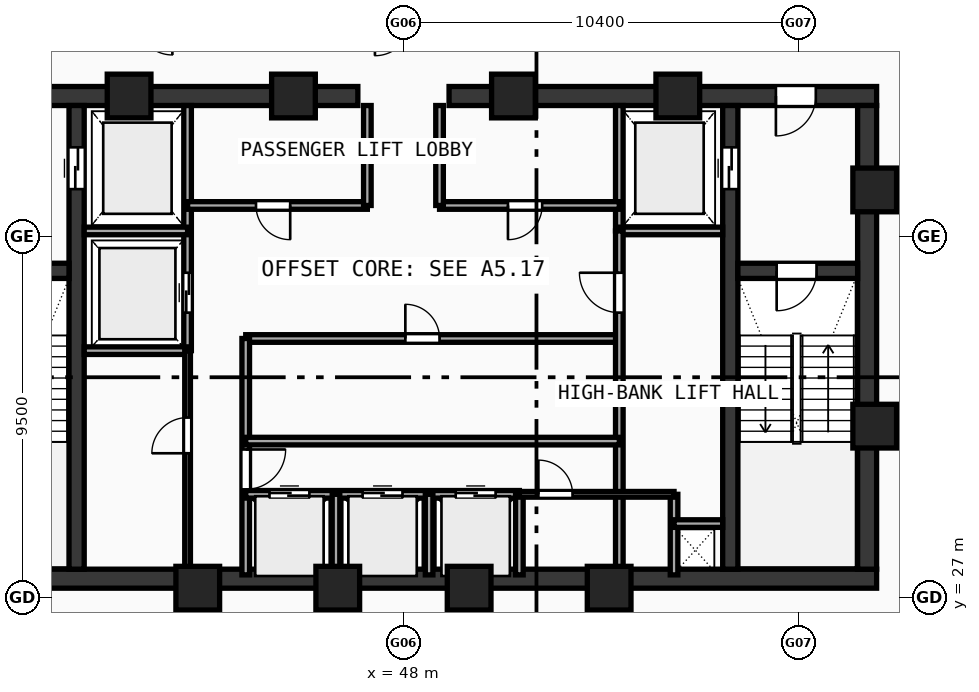
"""IFC4 building model, lengths in metres.
Left out: names, types, materials, properties, quantities, classifications, styles, units other than length and angle.
Written with IfcOpenShell. Run it as: python <this file> out.ifc"""

import sys

from ifc_helpers import new_model, si_unit, direction, frame, frame_2d, origin, origin_with_axes, origin_2d, place, context, subcontext, project, spatial, rectangle, hollow_rectangle, extrude, source, transform, mapped, element, fill, save


model = new_model("IFC4")
c1 = context("Model", 3, precision=1e-05, world=origin(), true_north=direction((0.0, 1.0)))
c2 = subcontext(c1, "Body", "Model", "MODEL_VIEW")
j1 = project(units=[si_unit("LENGTHUNIT", "METRE"), si_unit("PLANEANGLEUNIT", "RADIAN")], contexts=[c1])
p1 = place(None, origin())
s1 = spatial("IfcSite", under=j1, at=p1, CompositionType="ELEMENT")
p2 = place(p1, origin())
s2 = spatial("IfcBuilding", under=s1, at=p2, CompositionType="ELEMENT")
p3 = place(p2, frame((0.0, 0.0, 255.72)))
s3 = spatial("IfcBuildingStorey", under=s2, at=p3, CompositionType="ELEMENT", Elevation=255.72)
p4 = place(p3, frame((35.55, 27.5, 0.0), z_axis=(0.0, 0.0, 1.0), x_axis=(1.0, 0.0, 0.0)))
e1 = element("IfcWall", 1, at=p4, inside=s3, PredefinedType="SHEAR", context=c2, shape_type="SweptSolid", body=[
    extrude(rectangle(XDim=24.9, YDim=0.5, at=frame_2d((12.45, 0.0))), origin(), (0.0, 0.0, 1.0), 3.47),
])
p5 = place(p3, frame((35.55, 40.2, 0.0), z_axis=(0.0, 0.0, 1.0), x_axis=(1.0, 0.0, 0.0)))
e2 = element("IfcWall", 2, at=p5, inside=s3, PredefinedType="SHEAR", context=c2, shape_type="SweptSolid", body=[
    extrude(rectangle(XDim=11.25, YDim=0.5, at=frame_2d((5.625, 0.0))), origin(), (0.0, 0.0, 1.0), 3.47),
])
p6 = place(p5, frame((1.6, 0.0, 0.0)))
e3 = element("IfcOpeningElement", 3, at=p6, cuts=e2, PredefinedType="OPENING", context=c2, shape_type="SweptSolid", body=[
    extrude(rectangle(XDim=1.05, YDim=2.1, at=frame_2d((0.525, 1.05))), frame((0.0, 0.26, 0.0), z_axis=(0.0, -1.0, 0.0), x_axis=(1.0, 0.0, 0.0)), (0.0, 0.0, 1.0), 0.52),
])
p7 = place(p3, frame((49.2, 40.2, 0.0), z_axis=(0.0, 0.0, 1.0), x_axis=(1.0, 0.0, 0.0)))
e4 = element("IfcWall", 4, at=p7, inside=s3, PredefinedType="SHEAR", context=c2, shape_type="SweptSolid", body=[
    extrude(rectangle(XDim=11.25, YDim=0.5, at=frame_2d((5.625, 0.0))), origin(), (0.0, 0.0, 1.0), 3.47),
])
p8 = place(p7, frame((8.6, 0.0, 0.0)))
e5 = element("IfcOpeningElement", 5, at=p8, cuts=e4, PredefinedType="OPENING", context=c2, shape_type="SweptSolid", body=[
    extrude(rectangle(XDim=1.05, YDim=2.1, at=frame_2d((0.525, 1.05))), frame((0.0, 0.26, 0.0), z_axis=(0.0, -1.0, 0.0), x_axis=(1.0, 0.0, 0.0)), (0.0, 0.0, 1.0), 0.52),
])
p9 = place(p3, frame((60.2, 27.75, 0.0), z_axis=(0.0, 0.0, 1.0), x_axis=(0.0, 1.0, 0.0)))
e6 = element("IfcWall", 6, at=p9, inside=s3, PredefinedType="SHEAR", context=c2, shape_type="SweptSolid", body=[
    extrude(rectangle(XDim=12.2, YDim=0.5, at=frame_2d((6.1, 0.0))), origin(), (0.0, 0.0, 1.0), 3.47),
])
p10 = place(p3, frame((39.4, 27.75, 0.0), z_axis=(0.0, 0.0, 1.0), x_axis=(0.0, 1.0, 0.0)))
e7 = element("IfcWall", 7, at=p10, inside=s3, PredefinedType="SHEAR", context=c2, shape_type="SweptSolid", body=[
    extrude(rectangle(XDim=12.2, YDim=0.4, at=frame_2d((6.1, 0.0))), origin(), (0.0, 0.0, 1.0), 3.47),
])
p11 = place(p10, frame((10.0, 0.0, 0.0)))
e8 = element("IfcOpeningElement", 8, at=p11, cuts=e7, PredefinedType="OPENING", context=c2, shape_type="SweptSolid", body=[
    extrude(rectangle(XDim=1.1, YDim=2.1, at=frame_2d((0.55, 1.05))), frame((0.0, 0.21, 0.0), z_axis=(0.0, -1.0, 0.0), x_axis=(1.0, 0.0, 0.0)), (0.0, 0.0, 1.0), 0.42),
])
p12 = place(p3, frame((56.6, 27.75, 0.0), z_axis=(0.0, 0.0, 1.0), x_axis=(0.0, 1.0, 0.0)))
e9 = element("IfcWall", 9, at=p12, inside=s3, PredefinedType="SHEAR", context=c2, shape_type="SweptSolid", body=[
    extrude(rectangle(XDim=12.2, YDim=0.4, at=frame_2d((6.1, 0.0))), origin(), (0.0, 0.0, 1.0), 3.47),
])
p13 = place(p12, frame((10.0, 0.0, 0.0)))
e10 = element("IfcOpeningElement", 10, at=p13, cuts=e9, PredefinedType="OPENING", context=c2, shape_type="SweptSolid", body=[
    extrude(rectangle(XDim=1.1, YDim=2.1, at=frame_2d((0.55, 1.05))), frame((0.0, 0.21, 0.0), z_axis=(0.0, -1.0, 0.0), x_axis=(1.0, 0.0, 0.0)), (0.0, 0.0, 1.0), 0.42),
])
p14 = place(p3, frame((36.05, 35.6, 0.0), z_axis=(0.0, 0.0, 1.0), x_axis=(1.0, 0.0, 0.0)))
e11 = element("IfcWall", 11, at=p14, inside=s3, PredefinedType="SHEAR", context=c2, shape_type="SweptSolid", body=[
    extrude(rectangle(XDim=3.15, YDim=0.4, at=frame_2d((1.575, 0.0))), origin(), (0.0, 0.0, 1.0), 3.47),
])
p15 = place(p14, frame((1.07, 0.0, 0.0)))
e12 = element("IfcOpeningElement", 12, at=p15, cuts=e11, PredefinedType="OPENING", context=c2, shape_type="SweptSolid", body=[
    extrude(rectangle(XDim=1.05, YDim=2.1, at=frame_2d((0.525, 1.05))), frame((0.0, 0.21, 0.0), z_axis=(0.0, -1.0, 0.0), x_axis=(1.0, 0.0, 0.0)), (0.0, 0.0, 1.0), 0.42),
])
p16 = place(p3, frame((56.8, 35.6, 0.0), z_axis=(0.0, 0.0, 1.0), x_axis=(1.0, 0.0, 0.0)))
e13 = element("IfcWall", 13, at=p16, inside=s3, PredefinedType="SHEAR", context=c2, shape_type="SweptSolid", body=[
    extrude(rectangle(XDim=3.15, YDim=0.4, at=frame_2d((1.575, 0.0))), origin(), (0.0, 0.0, 1.0), 3.47),
])
p17 = place(p16, frame((1.02, 0.0, 0.0)))
e14 = element("IfcOpeningElement", 14, at=p17, cuts=e13, PredefinedType="OPENING", context=c2, shape_type="SweptSolid", body=[
    extrude(rectangle(XDim=1.05, YDim=2.1, at=frame_2d((0.525, 1.05))), frame((0.0, 0.21, 0.0), z_axis=(0.0, -1.0, 0.0), x_axis=(1.0, 0.0, 0.0)), (0.0, 0.0, 1.0), 0.42),
])
m1 = source(origin(), c2, "Body", "SweptSolid", [
    extrude(hollow_rectangle(XDim=1.15, YDim=1.15, WallThickness=0.048, at=origin_2d()), origin(), (0.0, 0.0, 1.0), 3.73),
])
for number, where, z_axis, x_axis in (
    (15, (42.588, 27.25, -0.26), (0.0, 0.0, 1.0), (1.0, 0.0, 0.0)),
    (16, (46.272, 27.25, -0.26), (0.0, 0.0, 1.0), (1.0, 0.0, 0.0)),
    (17, (49.729, 27.25, -0.26), (0.0, 0.0, 1.0), (1.0, 0.0, 0.0)),
    (18, (53.412, 27.25, -0.26), (0.0, 0.0, 1.0), (1.0, 0.0, 0.0)),
    (19, (60.4, 31.513, -0.26), (0.0, 0.0, 1.0), (1.0, 0.0, 0.0)),
    (20, (60.4, 37.729, -0.26), (0.0, 0.0, 1.0), (1.0, 0.0, 0.0)),
    (21, (55.219, 40.2, -0.26), (0.0, 0.0, 1.0), (1.0, 0.0, 0.0)),
    (22, (50.894, 40.2, -0.26), (0.0, 0.0, 1.0), (1.0, 0.0, 0.0)),
    (23, (45.106, 40.2, -0.26), (0.0, 0.0, 1.0), (1.0, 0.0, 0.0)),
    (24, (40.781, 40.2, -0.26), (0.0, 0.0, 1.0), (1.0, 0.0, 0.0)),
):
    element("IfcColumn", number, at=place(p3, frame(where, z_axis=z_axis, x_axis=x_axis)), inside=s3, PredefinedType="COLUMN", context=c2, shape_type="MappedRepresentation", body=[
        mapped(m1, transform((0.0, 0.0, 0.0), scale=1.0)),
    ])
p18 = place(p3, frame((42.32, 33.5, 0.0), z_axis=(0.0, 0.0, 1.0), x_axis=(0.0, 1.0, 0.0)))
e25 = element("IfcWall", 25, at=p18, inside=s3, PredefinedType="SOLIDWALL", context=c2, shape_type="SweptSolid", body=[
    extrude(rectangle(XDim=6.45, YDim=0.2, at=frame_2d((3.225, 0.0))), origin(), (0.0, 0.0, 1.0), 3.47),
])
p19 = place(p18, frame((1.0, 0.0, 0.0)))
e26 = element("IfcOpeningElement", 26, at=p19, cuts=e25, PredefinedType="OPENING", context=c2, shape_type="SweptSolid", body=[
    extrude(rectangle(XDim=1.05, YDim=2.1, at=frame_2d((0.525, 1.05))), frame((0.0, 0.11, 0.0), z_axis=(0.0, -1.0, 0.0), x_axis=(1.0, 0.0, 0.0)), (0.0, 0.0, 1.0), 0.22),
])
for number, where, z_axis, x_axis in (
    (27, (39.6, 36.65, 0.0), (0.0, 0.0, 1.0), (1.0, 0.0, 0.0)),
    (28, (39.6, 33.5, 0.0), (0.0, 0.0, 1.0), (1.0, 0.0, 0.0)),
):
    element("IfcWall", number, at=place(p3, frame(where, z_axis=z_axis, x_axis=x_axis)), inside=s3, PredefinedType="SOLIDWALL", context=c2, shape_type="SweptSolid", body=[
        extrude(rectangle(XDim=2.72, YDim=0.2, at=frame_2d((1.36, 0.0))), origin(), (0.0, 0.0, 1.0), 3.47),
    ])
p20 = place(p3, frame((53.68, 36.65, 0.0), z_axis=(0.0, 0.0, 1.0), x_axis=(0.0, 1.0, 0.0)))
e29 = element("IfcWall", 29, at=p20, inside=s3, PredefinedType="SOLIDWALL", context=c2, shape_type="SweptSolid", body=[
    extrude(rectangle(XDim=3.3, YDim=0.2, at=frame_2d((1.65, 0.0))), origin(), (0.0, 0.0, 1.0), 3.47),
])
p21 = place(p3, frame((53.68, 36.65, 0.0), z_axis=(0.0, 0.0, 1.0), x_axis=(1.0, 0.0, 0.0)))
e30 = element("IfcWall", 30, at=p21, inside=s3, PredefinedType="SOLIDWALL", context=c2, shape_type="SweptSolid", body=[
    extrude(rectangle(XDim=2.72, YDim=0.2, at=frame_2d((1.36, 0.0))), origin(), (0.0, 0.0, 1.0), 3.47),
])
p22 = place(p3, frame((42.32, 37.32, 0.0), z_axis=(0.0, 0.0, 1.0), x_axis=(1.0, 0.0, 0.0)))
e31 = element("IfcWall", 31, at=p22, inside=s3, PredefinedType="SOLIDWALL", context=c2, shape_type="SweptSolid", body=[
    extrude(rectangle(XDim=4.73, YDim=0.2, at=frame_2d((2.365, 0.0))), origin(), (0.0, 0.0, 1.0), 3.47),
])
p23 = place(p22, frame((1.8, 0.0, 0.0)))
e32 = element("IfcOpeningElement", 32, at=p23, cuts=e31, PredefinedType="OPENING", context=c2, shape_type="SweptSolid", body=[
    extrude(rectangle(XDim=0.9, YDim=2.1, at=frame_2d((0.45, 1.05))), frame((0.0, 0.11, 0.0), z_axis=(0.0, -1.0, 0.0), x_axis=(1.0, 0.0, 0.0)), (0.0, 0.0, 1.0), 0.22),
])
p24 = place(p3, frame((48.95, 37.32, 0.0), z_axis=(0.0, 0.0, 1.0), x_axis=(1.0, 0.0, 0.0)))
e33 = element("IfcWall", 33, at=p24, inside=s3, PredefinedType="SOLIDWALL", context=c2, shape_type="SweptSolid", body=[
    extrude(rectangle(XDim=4.73, YDim=0.2, at=frame_2d((2.365, 0.0))), origin(), (0.0, 0.0, 1.0), 3.47),
])
p25 = place(p24, frame((1.8, 0.0, 0.0)))
e34 = element("IfcOpeningElement", 34, at=p25, cuts=e33, PredefinedType="OPENING", context=c2, shape_type="SweptSolid", body=[
    extrude(rectangle(XDim=0.9, YDim=2.1, at=frame_2d((0.45, 1.05))), frame((0.0, 0.11, 0.0), z_axis=(0.0, -1.0, 0.0), x_axis=(1.0, 0.0, 0.0)), (0.0, 0.0, 1.0), 0.22),
])
for number, where, z_axis, x_axis in (
    (35, (47.05, 37.32, 0.0), (0.0, 0.0, 1.0), (0.0, 1.0, 0.0)),
    (36, (48.95, 37.32, 0.0), (0.0, 0.0, 1.0), (0.0, 1.0, 0.0)),
):
    element("IfcWall", number, at=place(p3, frame(where, z_axis=z_axis, x_axis=x_axis)), inside=s3, PredefinedType="SOLIDWALL", context=c2, shape_type="SweptSolid", body=[
        extrude(rectangle(XDim=2.63, YDim=0.2, at=frame_2d((1.315, 0.0))), origin(), (0.0, 0.0, 1.0), 3.47),
    ])
p26 = place(p3, frame((43.85, 33.82, 0.0), z_axis=(0.0, 0.0, 1.0), x_axis=(1.0, 0.0, 0.0)))
e37 = element("IfcWall", 37, at=p26, inside=s3, PredefinedType="SOLIDWALL", context=c2, shape_type="SweptSolid", body=[
    extrude(rectangle(XDim=9.83, YDim=0.2, at=frame_2d((4.915, 0.0))), origin(), (0.0, 0.0, 1.0), 3.47),
])
p27 = place(p26, frame((4.2, 0.0, 0.0)))
e38 = element("IfcOpeningElement", 38, at=p27, cuts=e37, PredefinedType="OPENING", context=c2, shape_type="SweptSolid", body=[
    extrude(rectangle(XDim=0.9, YDim=2.1, at=frame_2d((0.45, 1.05))), frame((0.0, 0.11, 0.0), z_axis=(0.0, -1.0, 0.0), x_axis=(1.0, 0.0, 0.0)), (0.0, 0.0, 1.0), 0.22),
])
p28 = place(p3, frame((43.85, 27.6, 0.0), z_axis=(0.0, 0.0, 1.0), x_axis=(0.0, 1.0, 0.0)))
e39 = element("IfcWall", 39, at=p28, inside=s3, PredefinedType="SOLIDWALL", context=c2, shape_type="SweptSolid", body=[
    extrude(rectangle(XDim=6.22, YDim=0.2, at=frame_2d((3.11, 0.0))), origin(), (0.0, 0.0, 1.0), 3.47),
])
p29 = place(p28, frame((2.25, 0.0, 0.0)))
e40 = element("IfcOpeningElement", 40, at=p29, cuts=e39, PredefinedType="OPENING", context=c2, shape_type="SweptSolid", body=[
    extrude(rectangle(XDim=1.05, YDim=2.1, at=frame_2d((0.525, 1.05))), frame((0.0, 0.11, 0.0), z_axis=(0.0, -1.0, 0.0), x_axis=(1.0, 0.0, 0.0)), (0.0, 0.0, 1.0), 0.22),
])
p30 = place(p3, frame((53.68, 27.6, 0.0), z_axis=(0.0, 0.0, 1.0), x_axis=(0.0, 1.0, 0.0)))
e41 = element("IfcWall", 41, at=p30, inside=s3, PredefinedType="SOLIDWALL", context=c2, shape_type="SweptSolid", body=[
    extrude(rectangle(XDim=9.05, YDim=0.2, at=frame_2d((4.525, 0.0))), origin(), (0.0, 0.0, 1.0), 3.47),
])
p31 = place(p30, frame((6.9, 0.0, 0.0)))
e42 = element("IfcOpeningElement", 42, at=p31, cuts=e41, PredefinedType="OPENING", context=c2, shape_type="SweptSolid", body=[
    extrude(rectangle(XDim=1.05, YDim=2.1, at=frame_2d((0.525, 1.05))), frame((0.0, 0.11, 0.0), z_axis=(0.0, -1.0, 0.0), x_axis=(1.0, 0.0, 0.0)), (0.0, 0.0, 1.0), 0.22),
])
p32 = place(p3, frame((43.85, 29.72, 0.0), z_axis=(0.0, 0.0, 1.0), x_axis=(1.0, 0.0, 0.0)))
e43 = element("IfcWall", 43, at=p32, inside=s3, PredefinedType="SOLIDWALL", context=c2, shape_type="SweptSolid", body=[
    extrude(rectangle(XDim=7.2, YDim=0.2, at=frame_2d((3.6, 0.0))), origin(), (0.0, 0.0, 1.0), 3.47),
])
p33 = place(p32, frame((0.625, 0.0, 0.0)))
e44 = element("IfcOpeningElement", 44, at=p33, cuts=e43, PredefinedType="OPENING", context=c2, shape_type="SweptSolid", body=[
    extrude(rectangle(XDim=1.05, YDim=2.1, at=frame_2d((0.525, 1.05))), frame((0.0, 0.11, 0.0), z_axis=(0.0, -1.0, 0.0), x_axis=(1.0, 0.0, 0.0)), (0.0, 0.0, 1.0), 0.22),
])
p34 = place(p32, frame((3.075, 0.0, 0.0)))
e45 = element("IfcOpeningElement", 45, at=p34, cuts=e43, PredefinedType="OPENING", context=c2, shape_type="SweptSolid", body=[
    extrude(rectangle(XDim=1.05, YDim=2.1, at=frame_2d((0.525, 1.05))), frame((0.0, 0.11, 0.0), z_axis=(0.0, -1.0, 0.0), x_axis=(1.0, 0.0, 0.0)), (0.0, 0.0, 1.0), 0.22),
])
p35 = place(p32, frame((5.525, 0.0, 0.0)))
e46 = element("IfcOpeningElement", 46, at=p35, cuts=e43, PredefinedType="OPENING", context=c2, shape_type="SweptSolid", body=[
    extrude(rectangle(XDim=1.05, YDim=2.1, at=frame_2d((0.525, 1.05))), frame((0.0, 0.11, 0.0), z_axis=(0.0, -1.0, 0.0), x_axis=(1.0, 0.0, 0.0)), (0.0, 0.0, 1.0), 0.22),
])
p36 = place(p3, frame((51.05, 27.6, 0.0), z_axis=(0.0, 0.0, 1.0), x_axis=(0.0, 1.0, 0.0)))
e47 = element("IfcWall", 47, at=p36, inside=s3, PredefinedType="SOLIDWALL", context=c2, shape_type="SweptSolid", body=[
    extrude(rectangle(XDim=2.12, YDim=0.2, at=frame_2d((1.06, 0.0))), origin(), (0.0, 0.0, 1.0), 3.47),
])
p37 = place(p3, frame((43.85, 31.12, 0.0), z_axis=(0.0, 0.0, 1.0), x_axis=(1.0, 0.0, 0.0)))
e48 = element("IfcWall", 48, at=p37, inside=s3, PredefinedType="SOLIDWALL", context=c2, shape_type="SweptSolid", body=[
    extrude(rectangle(XDim=9.83, YDim=0.2, at=frame_2d((4.915, 0.0))), origin(), (0.0, 0.0, 1.0), 3.47),
])
for number, where, z_axis, x_axis in (
    (49, (46.225, 27.6, 0.0), (0.0, 0.0, 1.0), (0.0, 1.0, 0.0)),
    (50, (48.675, 27.6, 0.0), (0.0, 0.0, 1.0), (0.0, 1.0, 0.0)),
    (51, (55.12, 27.6, 0.0), (0.0, 0.0, 1.0), (0.0, 1.0, 0.0)),
):
    element("IfcWall", number, at=place(p3, frame(where, z_axis=z_axis, x_axis=x_axis)), inside=s3, PredefinedType="SOLIDWALL", context=c2, shape_type="SweptSolid", body=[
        extrude(rectangle(XDim=2.12, YDim=0.2, at=frame_2d((1.06, 0.0))), origin(), (0.0, 0.0, 1.0), 3.47),
    ])
p38 = place(p3, frame((55.12, 28.95, 0.0), z_axis=(0.0, 0.0, 1.0), x_axis=(1.0, 0.0, 0.0)))
e52 = element("IfcWall", 52, at=p38, inside=s3, PredefinedType="SOLIDWALL", context=c2, shape_type="SweptSolid", body=[
    extrude(rectangle(XDim=1.28, YDim=0.2, at=frame_2d((0.64, 0.0))), origin(), (0.0, 0.0, 1.0), 3.47),
])
p39 = place(p3, frame((42.32, 27.6, 0.0), z_axis=(0.0, 0.0, 1.0), x_axis=(0.0, 1.0, 0.0)))
e53 = element("IfcWall", 53, at=p39, inside=s3, PredefinedType="PARTITIONING", context=c2, shape_type="SweptSolid", body=[
    extrude(rectangle(XDim=5.9, YDim=0.15, at=frame_2d((2.95, 0.0))), origin(), (0.0, 0.0, 1.0), 3.47),
])
p40 = place(p39, frame((3.2, 0.0, 0.0)))
e54 = element("IfcOpeningElement", 54, at=p40, cuts=e53, PredefinedType="OPENING", context=c2, shape_type="SweptSolid", body=[
    extrude(rectangle(XDim=0.94, YDim=2.1, at=frame_2d((0.47, 1.05))), frame((0.0, 0.085, 0.0), z_axis=(0.0, -1.0, 0.0), x_axis=(1.0, 0.0, 0.0)), (0.0, 0.0, 1.0), 0.17),
])
p41 = place(p3, frame((51.05, 29.72, 0.0), z_axis=(0.0, 0.0, 1.0), x_axis=(1.0, 0.0, 0.0)))
e55 = element("IfcWall", 55, at=p41, inside=s3, PredefinedType="PARTITIONING", context=c2, shape_type="SweptSolid", body=[
    extrude(rectangle(XDim=4.07, YDim=0.15, at=frame_2d((2.035, 0.0))), origin(), (0.0, 0.0, 1.0), 3.47),
])
p42 = place(p41, frame((0.5, 0.0, 0.0)))
e56 = element("IfcOpeningElement", 56, at=p42, cuts=e55, PredefinedType="OPENING", context=c2, shape_type="SweptSolid", body=[
    extrude(rectangle(XDim=0.9, YDim=2.1, at=frame_2d((0.45, 1.05))), frame((0.0, 0.085, 0.0), z_axis=(0.0, -1.0, 0.0), x_axis=(1.0, 0.0, 0.0)), (0.0, 0.0, 1.0), 0.17),
])
m2 = source(origin(), c2, "Body", "SweptSolid", [
    extrude(rectangle(XDim=1.05, YDim=2.1, at=frame_2d((0.525, 1.05))), frame((0.0, 0.025, 0.0), z_axis=(0.0, -1.0, 0.0), x_axis=(1.0, 0.0, 0.0)), (0.0, 0.0, 1.0), 0.05),
])
p43 = place(p17, frame((1.05, 0.0, 0.0), z_axis=(0.0, 0.0, 1.0), x_axis=(-1.0, 0.0, 0.0)))
e57 = element("IfcDoor", 57, at=p43, inside=s3, OperationType="SINGLE_SWING_RIGHT", PredefinedType="DOOR", context=c2, shape_type="MappedRepresentation", body=[
    mapped(m2, transform((0.0, 0.0, 0.0), scale=1.0)),
])
fill(e14, e57)
p44 = place(p8, frame((1.05, 0.0, 0.0), z_axis=(0.0, 0.0, 1.0), x_axis=(-1.0, 0.0, 0.0)))
e58 = element("IfcDoor", 58, at=p44, inside=s3, OperationType="SINGLE_SWING_RIGHT", PredefinedType="DOOR", context=c2, shape_type="MappedRepresentation", body=[
    mapped(m2, transform((0.0, 0.0, 0.0), scale=1.0)),
])
fill(e5, e58)
m3 = source(origin(), c2, "Body", "SweptSolid", [
    extrude(rectangle(XDim=1.1, YDim=2.1, at=frame_2d((0.55, 1.05))), frame((0.0, 0.025, 0.0), z_axis=(0.0, -1.0, 0.0), x_axis=(1.0, 0.0, 0.0)), (0.0, 0.0, 1.0), 0.05),
])
p45 = place(p11, frame((1.1, 0.0, 0.0), z_axis=(0.0, 0.0, 1.0), x_axis=(-1.0, 0.0, 0.0)))
e59 = element("IfcDoor", 59, at=p45, inside=s3, OperationType="DOUBLE_DOOR_SLIDING", PredefinedType="DOOR", context=c2, shape_type="MappedRepresentation", body=[
    mapped(m3, transform((0.0, 0.0, 0.0), scale=1.0)),
])
fill(e8, e59)
p46 = place(p13, origin_with_axes())
e60 = element("IfcDoor", 60, at=p46, inside=s3, OperationType="DOUBLE_DOOR_SLIDING", PredefinedType="DOOR", context=c2, shape_type="MappedRepresentation", body=[
    mapped(m3, transform((0.0, 0.0, 0.0), scale=1.0)),
])
fill(e10, e60)
p47 = place(p19, origin_with_axes())
e61 = element("IfcDoor", 61, at=p47, inside=s3, OperationType="DOUBLE_DOOR_SLIDING", PredefinedType="DOOR", context=c2, shape_type="MappedRepresentation", body=[
    mapped(m2, transform((0.0, 0.0, 0.0), scale=1.0)),
])
fill(e26, e61)
m4 = source(origin(), c2, "Body", "SweptSolid", [
    extrude(rectangle(XDim=0.9, YDim=2.1, at=frame_2d((0.45, 1.05))), frame((0.0, 0.025, 0.0), z_axis=(0.0, -1.0, 0.0), x_axis=(1.0, 0.0, 0.0)), (0.0, 0.0, 1.0), 0.05),
])
p48 = place(p23, frame((0.9, 0.0, 0.0), z_axis=(0.0, 0.0, 1.0), x_axis=(-1.0, 0.0, 0.0)))
e62 = element("IfcDoor", 62, at=p48, inside=s3, OperationType="SINGLE_SWING_LEFT", PredefinedType="DOOR", context=c2, shape_type="MappedRepresentation", body=[
    mapped(m4, transform((0.0, 0.0, 0.0), scale=1.0)),
])
fill(e32, e62)
p49 = place(p25, frame((0.9, 0.0, 0.0), z_axis=(0.0, 0.0, 1.0), x_axis=(-1.0, 0.0, 0.0)))
e63 = element("IfcDoor", 63, at=p49, inside=s3, OperationType="SINGLE_SWING_RIGHT", PredefinedType="DOOR", context=c2, shape_type="MappedRepresentation", body=[
    mapped(m4, transform((0.0, 0.0, 0.0), scale=1.0)),
])
fill(e34, e63)
p50 = place(p27, origin_with_axes())
e64 = element("IfcDoor", 64, at=p50, inside=s3, OperationType="SINGLE_SWING_LEFT", PredefinedType="DOOR", context=c2, shape_type="MappedRepresentation", body=[
    mapped(m4, transform((0.0, 0.0, 0.0), scale=1.0)),
])
fill(e38, e64)
p51 = place(p29, frame((1.05, 0.0, 0.0), z_axis=(0.0, 0.0, 1.0), x_axis=(-1.0, 0.0, 0.0)))
e65 = element("IfcDoor", 65, at=p51, inside=s3, OperationType="SINGLE_SWING_LEFT", PredefinedType="DOOR", context=c2, shape_type="MappedRepresentation", body=[
    mapped(m2, transform((0.0, 0.0, 0.0), scale=1.0)),
])
fill(e40, e65)
p52 = place(p31, origin_with_axes())
e66 = element("IfcDoor", 66, at=p52, inside=s3, OperationType="SINGLE_SWING_RIGHT", PredefinedType="DOOR", context=c2, shape_type="MappedRepresentation", body=[
    mapped(m2, transform((0.0, 0.0, 0.0), scale=1.0)),
])
fill(e42, e66)
p53 = place(p33, origin_with_axes())
e67 = element("IfcDoor", 67, at=p53, inside=s3, OperationType="DOUBLE_DOOR_SLIDING", PredefinedType="DOOR", context=c2, shape_type="MappedRepresentation", body=[
    mapped(m2, transform((0.0, 0.0, 0.0), scale=1.0)),
])
fill(e44, e67)
p54 = place(p34, origin_with_axes())
e68 = element("IfcDoor", 68, at=p54, inside=s3, OperationType="DOUBLE_DOOR_SLIDING", PredefinedType="DOOR", context=c2, shape_type="MappedRepresentation", body=[
    mapped(m2, transform((0.0, 0.0, 0.0), scale=1.0)),
])
fill(e45, e68)
p55 = place(p35, origin_with_axes())
e69 = element("IfcDoor", 69, at=p55, inside=s3, OperationType="DOUBLE_DOOR_SLIDING", PredefinedType="DOOR", context=c2, shape_type="MappedRepresentation", body=[
    mapped(m2, transform((0.0, 0.0, 0.0), scale=1.0)),
])
fill(e46, e69)
m5 = source(origin(), c2, "Body", "SweptSolid", [
    extrude(rectangle(XDim=0.94, YDim=2.1, at=frame_2d((0.47, 1.05))), frame((0.0, 0.025, 0.0), z_axis=(0.0, -1.0, 0.0), x_axis=(1.0, 0.0, 0.0)), (0.0, 0.0, 1.0), 0.05),
])
p56 = place(p40, origin_with_axes())
e70 = element("IfcDoor", 70, at=p56, inside=s3, OperationType="SINGLE_SWING_LEFT", PredefinedType="DOOR", context=c2, shape_type="MappedRepresentation", body=[
    mapped(m5, transform((0.0, 0.0, 0.0), scale=1.0)),
])
fill(e54, e70)
p57 = place(p42, origin_with_axes())
e71 = element("IfcDoor", 71, at=p57, inside=s3, OperationType="SINGLE_SWING_LEFT", PredefinedType="DOOR", context=c2, shape_type="MappedRepresentation", body=[
    mapped(m4, transform((0.0, 0.0, 0.0), scale=1.0)),
])
fill(e56, e71)
save(model, sys.argv[1])
